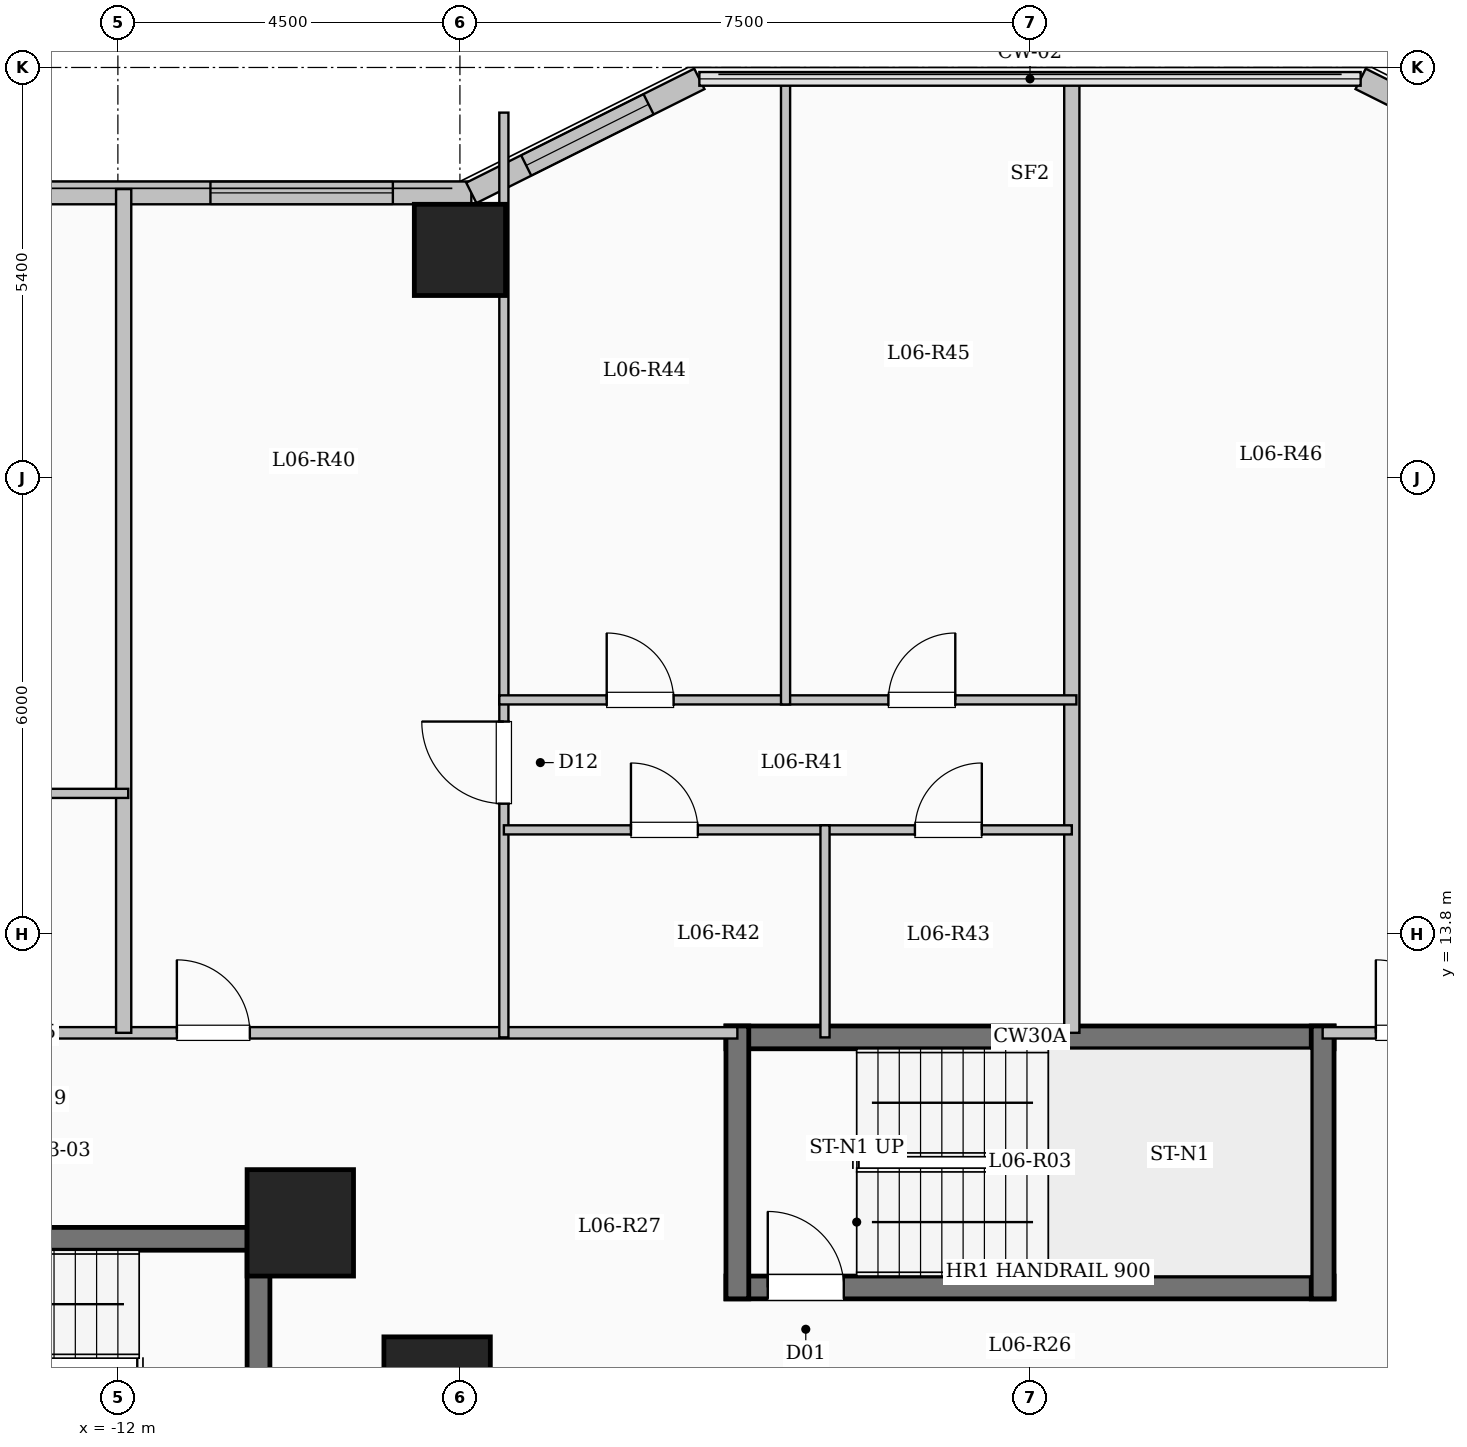
"""IFC4 building model, lengths in metres.
Left out: names, types, materials, properties, quantities, classifications, styles, units other than length and angle.
Written with IfcOpenShell. Run it as: python <this file> out.ifc"""

import sys

from ifc_helpers import new_model, si_unit, direction, frame, frame_2d, origin, origin_2d, place, context, subcontext, project, spatial, rectangle, extrude, element, fill, save


model = new_model("IFC4")
c1 = context("Model", 3, precision=1e-05, world=origin(), true_north=direction((0.0, 1.0)))
c2 = subcontext(c1, "Body", "Model", "MODEL_VIEW")
j1 = project(units=[si_unit("LENGTHUNIT", "METRE"), si_unit("PLANEANGLEUNIT", "RADIAN")], contexts=[c1])
p1 = place(None, origin())
s1 = spatial("IfcSite", under=j1, at=p1, CompositionType="ELEMENT")
p2 = place(p1, origin())
s2 = spatial("IfcBuilding", under=s1, at=p2, CompositionType="ELEMENT")
p3 = place(p2, frame((0.0, 0.0, 27.35)))
s3 = spatial("IfcBuildingStorey", under=s2, at=p3, CompositionType="ELEMENT", Elevation=27.35)
for number, where, z_axis, x_axis in (
    (1, (-7.8, 7.8, 0.0), (0.0, 0.0, 1.0), (1.0, 0.0, 0.0)),
    (2, (-9.6, 10.0, 0.0), (0.0, 0.0, 1.0), (1.0, 0.0, 0.0)),
):
    element("IfcColumn", number, at=place(p3, frame(where, z_axis=z_axis, x_axis=x_axis)), inside=s3, PredefinedType="COLUMN", context=c2, shape_type="SweptSolid", body=[
        extrude(rectangle(XDim=1.4, YDim=1.4, at=origin_2d()), origin(), (0.0, 0.0, 1.0), 3.35),
    ])
p4 = place(p3, frame((-7.5, 22.8, 0.0), z_axis=(0.0, 0.0, 1.0), x_axis=(1.0, 0.0, 0.0)))
e3 = element("IfcColumn", 3, at=p4, inside=s3, PredefinedType="COLUMN", context=c2, shape_type="SweptSolid", body=[
    extrude(rectangle(XDim=1.2, YDim=1.2, at=origin_2d()), origin(), (0.0, 0.0, 1.0), 3.35),
])
p5 = place(p3, frame((-22.65, 23.55, 0.0), z_axis=(0.0, 0.0, 1.0), x_axis=(1.0, 0.0, 0.0)))
e4 = element("IfcWall", 4, at=p5, inside=s3, PredefinedType="SOLIDWALL", context=c2, shape_type="SweptSolid", body=[
    extrude(rectangle(XDim=15.3, YDim=0.3, at=frame_2d((7.65, 0.0))), origin(), (0.0, 0.0, 1.0), 3.1),
])
p6 = place(p5, frame((1.81, 0.0, 0.9)))
e5 = element("IfcOpeningElement", 5, at=p6, cuts=e4, PredefinedType="OPENING", context=c2, shape_type="SweptSolid", body=[
    extrude(rectangle(XDim=2.4, YDim=1.8, at=frame_2d((1.2, 0.9))), frame((0.0, 0.16, 0.0), z_axis=(0.0, -1.0, 0.0), x_axis=(1.0, 0.0, 0.0)), (0.0, 0.0, 1.0), 0.32),
])
p7 = place(p5, frame((7.427, 0.0, 0.9)))
e6 = element("IfcOpeningElement", 6, at=p7, cuts=e4, PredefinedType="OPENING", context=c2, shape_type="SweptSolid", body=[
    extrude(rectangle(XDim=1.8, YDim=1.65, at=frame_2d((0.9, 0.825))), frame((0.0, 0.16, 0.0), z_axis=(0.0, -1.0, 0.0), x_axis=(1.0, 0.0, 0.0)), (0.0, 0.0, 1.0), 0.32),
])
p8 = place(p5, frame((11.868, 0.0, 0.9)))
e7 = element("IfcOpeningElement", 7, at=p8, cuts=e4, PredefinedType="OPENING", context=c2, shape_type="SweptSolid", body=[
    extrude(rectangle(XDim=2.4, YDim=1.8, at=frame_2d((1.2, 0.9))), frame((0.0, 0.16, 0.0), z_axis=(0.0, -1.0, 0.0), x_axis=(1.0, 0.0, 0.0)), (0.0, 0.0, 1.0), 0.32),
])
p9 = place(p3, frame((-7.35, 23.55, 0.0), z_axis=(0.0, 0.0, 1.0), x_axis=(0.894427191, 0.4472135955, 0.0)))
e8 = element("IfcWall", 8, at=p9, inside=s3, PredefinedType="SOLIDWALL", context=c2, shape_type="SweptSolid", body=[
    extrude(rectangle(XDim=3.354, YDim=0.3, at=frame_2d((1.677, 0.0))), origin(), (0.0, 0.0, 1.0), 3.1),
])
p10 = place(p9, frame((0.807, 0.0, 0.9)))
e9 = element("IfcOpeningElement", 9, at=p10, cuts=e8, PredefinedType="OPENING", context=c2, shape_type="SweptSolid", body=[
    extrude(rectangle(XDim=1.8, YDim=1.65, at=frame_2d((0.9, 0.825))), frame((0.0, 0.16, 0.0), z_axis=(0.0, -1.0, 0.0), x_axis=(1.0, 0.0, 0.0)), (0.0, 0.0, 1.0), 0.32),
])
p11 = place(p3, frame((4.35, 25.05, 0.0), z_axis=(0.0, 0.0, 1.0), x_axis=(0.894427191, -0.4472135955, 0.0)))
e10 = element("IfcWall", 10, at=p11, inside=s3, PredefinedType="SOLIDWALL", context=c2, shape_type="SweptSolid", body=[
    extrude(rectangle(XDim=3.354, YDim=0.3, at=frame_2d((1.677, 0.0))), origin(), (0.0, 0.0, 1.0), 3.1),
])
p12 = place(p11, frame((2.308, 0.0, 0.95)))
e11 = element("IfcOpeningElement", 11, at=p12, cuts=e10, PredefinedType="OPENING", context=c2, shape_type="SweptSolid", body=[
    extrude(rectangle(XDim=0.7, YDim=1.5, at=frame_2d((0.35, 0.75))), frame((0.0, 0.16, 0.0), z_axis=(0.0, -1.0, 0.0), x_axis=(1.0, 0.0, 0.0)), (0.0, 0.0, 1.0), 0.32),
])
p13 = place(p3, frame((-18.0, 9.79, 0.0), z_axis=(0.0, 0.0, 1.0), x_axis=(1.0, 0.0, 0.0)))
e12 = element("IfcWall", 12, at=p13, inside=s3, PredefinedType="SHEAR", context=c2, shape_type="SweptSolid", body=[
    extrude(rectangle(XDim=8.0, YDim=0.3, at=frame_2d((4.0, 0.0))), origin(), (0.0, 0.0, 1.0), 3.35),
])
p14 = place(p3, frame((-10.15, 6.35, 0.0), z_axis=(0.0, 0.0, 1.0), x_axis=(0.0, 1.0, 0.0)))
e13 = element("IfcWall", 13, at=p14, inside=s3, PredefinedType="SHEAR", context=c2, shape_type="SweptSolid", body=[
    extrude(rectangle(XDim=3.59, YDim=0.3, at=frame_2d((1.795, 0.0))), origin(), (0.0, 0.0, 1.0), 3.35),
])
p15 = place(p3, frame((-4.0, 12.44, 0.0), z_axis=(0.0, 0.0, 1.0), x_axis=(1.0, 0.0, 0.0)))
e14 = element("IfcWall", 14, at=p15, inside=s3, PredefinedType="SHEAR", context=c2, shape_type="SweptSolid", body=[
    extrude(rectangle(XDim=8.0, YDim=0.3, at=frame_2d((4.0, 0.0))), origin(), (0.0, 0.0, 1.0), 3.35),
])
p16 = place(p3, frame((-4.0, 9.15, 0.0), z_axis=(0.0, 0.0, 1.0), x_axis=(1.0, 0.0, 0.0)))
e15 = element("IfcWall", 15, at=p16, inside=s3, PredefinedType="SHEAR", context=c2, shape_type="SweptSolid", body=[
    extrude(rectangle(XDim=8.0, YDim=0.3, at=frame_2d((4.0, 0.0))), origin(), (0.0, 0.0, 1.0), 3.35),
])
p17 = place(p16, frame((0.55, 0.0, 0.0)))
e16 = element("IfcOpeningElement", 16, at=p17, cuts=e15, PredefinedType="OPENING", context=c2, shape_type="SweptSolid", body=[
    extrude(rectangle(XDim=1.0, YDim=2.15, at=frame_2d((0.5, 1.075))), frame((0.0, 0.16, 0.0), z_axis=(0.0, -1.0, 0.0), x_axis=(1.0, 0.0, 0.0)), (0.0, 0.0, 1.0), 0.32),
])
for number, where, z_axis, x_axis in (
    (17, (-3.85, 9.0, 0.0), (0.0, 0.0, 1.0), (0.0, 1.0, 0.0)),
    (18, (3.85, 9.0, 0.0), (0.0, 0.0, 1.0), (0.0, 1.0, 0.0)),
):
    element("IfcWall", number, at=place(p3, frame(where, z_axis=z_axis, x_axis=x_axis)), inside=s3, PredefinedType="SHEAR", context=c2, shape_type="SweptSolid", body=[
        extrude(rectangle(XDim=3.59, YDim=0.3, at=frame_2d((1.795, 0.0))), origin(), (0.0, 0.0, 1.0), 3.35),
    ])
p18 = place(p3, frame((-22.55, 12.5, 0.0), z_axis=(0.0, 0.0, 1.0), x_axis=(1.0, 0.0, 0.0)))
e19 = element("IfcWall", 19, at=p18, inside=s3, PredefinedType="PARTITIONING", context=c2, shape_type="SweptSolid", body=[
    extrude(rectangle(XDim=18.7, YDim=0.15, at=frame_2d((9.35, 0.0))), origin(), (0.0, 0.0, 1.0), 3.1),
])
p19 = place(p18, frame((0.7, 0.0, 0.0)))
e20 = element("IfcOpeningElement", 20, at=p19, cuts=e19, PredefinedType="OPENING", context=c2, shape_type="SweptSolid", body=[
    extrude(rectangle(XDim=0.96, YDim=2.15, at=frame_2d((0.48, 1.075))), frame((0.0, 0.085, 0.0), z_axis=(0.0, -1.0, 0.0), x_axis=(1.0, 0.0, 0.0)), (0.0, 0.0, 1.0), 0.17),
])
p20 = place(p18, frame((11.326, 0.0, 0.0)))
e21 = element("IfcOpeningElement", 21, at=p20, cuts=e19, PredefinedType="OPENING", context=c2, shape_type="SweptSolid", body=[
    extrude(rectangle(XDim=0.96, YDim=2.15, at=frame_2d((0.48, 1.075))), frame((0.0, 0.085, 0.0), z_axis=(0.0, -1.0, 0.0), x_axis=(1.0, 0.0, 0.0)), (0.0, 0.0, 1.0), 0.17),
])
p21 = place(p3, frame((3.85, 12.5, 0.0), z_axis=(0.0, 0.0, 1.0), x_axis=(1.0, 0.0, 0.0)))
e22 = element("IfcWall", 22, at=p21, inside=s3, PredefinedType="PARTITIONING", context=c2, shape_type="SweptSolid", body=[
    extrude(rectangle(XDim=18.7, YDim=0.15, at=frame_2d((9.35, 0.0))), origin(), (0.0, 0.0, 1.0), 3.1),
])
p22 = place(p21, frame((0.7, 0.0, 0.0)))
e23 = element("IfcOpeningElement", 23, at=p22, cuts=e22, PredefinedType="OPENING", context=c2, shape_type="SweptSolid", body=[
    extrude(rectangle(XDim=0.96, YDim=2.15, at=frame_2d((0.48, 1.075))), frame((0.0, 0.085, 0.0), z_axis=(0.0, -1.0, 0.0), x_axis=(1.0, 0.0, 0.0)), (0.0, 0.0, 1.0), 0.17),
])
p23 = place(p21, frame((8.4, 0.0, 0.0)))
e24 = element("IfcOpeningElement", 24, at=p23, cuts=e22, PredefinedType="OPENING", context=c2, shape_type="SweptSolid", body=[
    extrude(rectangle(XDim=0.96, YDim=2.15, at=frame_2d((0.48, 1.075))), frame((0.0, 0.085, 0.0), z_axis=(0.0, -1.0, 0.0), x_axis=(1.0, 0.0, 0.0)), (0.0, 0.0, 1.0), 0.17),
])
p24 = place(p3, frame((0.55, 12.5, 0.0), z_axis=(0.0, 0.0, 1.0), x_axis=(0.0, 1.0, 0.0)))
e25 = element("IfcWall", 25, at=p24, inside=s3, PredefinedType="SOLIDWALL", context=c2, shape_type="SweptSolid", body=[
    extrude(rectangle(XDim=12.58, YDim=0.2, at=frame_2d((6.29, 0.0))), origin(), (0.0, 0.0, 1.0), 3.1),
])
p25 = place(p3, frame((-11.924, 12.5, 0.0), z_axis=(0.0, 0.0, 1.0), x_axis=(0.0, 1.0, 0.0)))
e26 = element("IfcWall", 26, at=p25, inside=s3, PredefinedType="SOLIDWALL", context=c2, shape_type="SweptSolid", body=[
    extrude(rectangle(XDim=11.1, YDim=0.2, at=frame_2d((5.55, 0.0))), origin(), (0.0, 0.0, 1.0), 3.1),
])
p26 = place(p3, frame((-16.744, 15.65, 0.0), z_axis=(0.0, 0.0, 1.0), x_axis=(1.0, 0.0, 0.0)))
e27 = element("IfcWall", 27, at=p26, inside=s3, PredefinedType="PARTITIONING", context=c2, shape_type="SweptSolid", body=[
    extrude(rectangle(XDim=4.88, YDim=0.12, at=frame_2d((2.44, 0.0))), origin(), (0.0, 0.0, 1.0), 3.1),
])
p27 = place(p3, frame((-6.922, 12.44, 0.0), z_axis=(0.0, 0.0, 1.0), x_axis=(0.0, 1.0, 0.0)))
e28 = element("IfcWall", 28, at=p27, inside=s3, PredefinedType="PARTITIONING", context=c2, shape_type="SweptSolid", body=[
    extrude(rectangle(XDim=12.166, YDim=0.12, at=frame_2d((6.083, 0.0))), origin(), (0.0, 0.0, 1.0), 3.1),
])
p28 = place(p27, frame((3.075, 0.0, 0.0)))
e29 = element("IfcOpeningElement", 29, at=p28, cuts=e28, PredefinedType="OPENING", context=c2, shape_type="SweptSolid", body=[
    extrude(rectangle(XDim=1.08, YDim=2.15, at=frame_2d((0.54, 1.075))), frame((0.0, 0.07, 0.0), z_axis=(0.0, -1.0, 0.0), x_axis=(1.0, 0.0, 0.0)), (0.0, 0.0, 1.0), 0.14),
])
p29 = place(p3, frame((-6.922, 15.17, 0.0), z_axis=(0.0, 0.0, 1.0), x_axis=(1.0, 0.0, 0.0)))
e30 = element("IfcWall", 30, at=p29, inside=s3, PredefinedType="PARTITIONING", context=c2, shape_type="SweptSolid", body=[
    extrude(rectangle(XDim=4.225, YDim=0.12, at=frame_2d((2.113, 0.0))), origin(), (0.0, 0.0, 1.0), 3.1),
])
p30 = place(p29, frame((1.672, 0.0, 0.0)))
e31 = element("IfcOpeningElement", 31, at=p30, cuts=e30, PredefinedType="OPENING", context=c2, shape_type="SweptSolid", body=[
    extrude(rectangle(XDim=0.88, YDim=2.1, at=frame_2d((0.44, 1.05))), frame((0.0, 0.07, 0.0), z_axis=(0.0, -1.0, 0.0), x_axis=(1.0, 0.0, 0.0)), (0.0, 0.0, 1.0), 0.14),
])
p31 = place(p3, frame((-2.697, 15.17, 0.0), z_axis=(0.0, 0.0, 1.0), x_axis=(1.0, 0.0, 0.0)))
e32 = element("IfcWall", 32, at=p31, inside=s3, PredefinedType="PARTITIONING", context=c2, shape_type="SweptSolid", body=[
    extrude(rectangle(XDim=3.247, YDim=0.12, at=frame_2d((1.624, 0.0))), origin(), (0.0, 0.0, 1.0), 3.1),
])
p32 = place(p31, frame((1.183, 0.0, 0.0)))
e33 = element("IfcOpeningElement", 33, at=p32, cuts=e32, PredefinedType="OPENING", context=c2, shape_type="SweptSolid", body=[
    extrude(rectangle(XDim=0.88, YDim=2.1, at=frame_2d((0.44, 1.05))), frame((0.0, 0.07, 0.0), z_axis=(0.0, -1.0, 0.0), x_axis=(1.0, 0.0, 0.0)), (0.0, 0.0, 1.0), 0.14),
])
p33 = place(p3, frame((-6.982, 16.88, 0.0), z_axis=(0.0, 0.0, 1.0), x_axis=(1.0, 0.0, 0.0)))
e34 = element("IfcWall", 34, at=p33, inside=s3, PredefinedType="PARTITIONING", context=c2, shape_type="SweptSolid", body=[
    extrude(rectangle(XDim=7.592, YDim=0.12, at=frame_2d((3.796, 0.0))), origin(), (0.0, 0.0, 1.0), 3.1),
])
p34 = place(p33, frame((1.413, 0.0, 0.0)))
e35 = element("IfcOpeningElement", 35, at=p34, cuts=e34, PredefinedType="OPENING", context=c2, shape_type="SweptSolid", body=[
    extrude(rectangle(XDim=0.88, YDim=2.1, at=frame_2d((0.44, 1.05))), frame((0.0, 0.07, 0.0), z_axis=(0.0, -1.0, 0.0), x_axis=(1.0, 0.0, 0.0)), (0.0, 0.0, 1.0), 0.14),
])
p35 = place(p33, frame((5.119, 0.0, 0.0)))
e36 = element("IfcOpeningElement", 36, at=p35, cuts=e34, PredefinedType="OPENING", context=c2, shape_type="SweptSolid", body=[
    extrude(rectangle(XDim=0.88, YDim=2.1, at=frame_2d((0.44, 1.05))), frame((0.0, 0.07, 0.0), z_axis=(0.0, -1.0, 0.0), x_axis=(1.0, 0.0, 0.0)), (0.0, 0.0, 1.0), 0.14),
])
p36 = place(p3, frame((-2.697, 12.44, 0.0), z_axis=(0.0, 0.0, 1.0), x_axis=(0.0, 1.0, 0.0)))
e37 = element("IfcWall", 37, at=p36, inside=s3, PredefinedType="PARTITIONING", context=c2, shape_type="SweptSolid", body=[
    extrude(rectangle(XDim=2.79, YDim=0.12, at=frame_2d((1.395, 0.0))), origin(), (0.0, 0.0, 1.0), 3.1),
])
p37 = place(p3, frame((-3.216, 16.82, 0.0), z_axis=(0.0, 0.0, 1.0), x_axis=(0.0, 1.0, 0.0)))
e38 = element("IfcWall", 38, at=p37, inside=s3, PredefinedType="PARTITIONING", context=c2, shape_type="SweptSolid", body=[
    extrude(rectangle(XDim=8.26, YDim=0.12, at=frame_2d((4.13, 0.0))), origin(), (0.0, 0.0, 1.0), 3.1),
])
p38 = place(p8, origin())
e39 = element("IfcWindow", 39, at=p38, inside=s3, PartitioningType="SINGLE_PANEL", PredefinedType="WINDOW", context=c2, shape_type="SweptSolid", body=[
    extrude(rectangle(XDim=2.4, YDim=1.8, at=frame_2d((1.2, 0.9))), frame((0.0, 0.03, 0.0), z_axis=(0.0, -1.0, 0.0), x_axis=(1.0, 0.0, 0.0)), (0.0, 0.0, 1.0), 0.06),
])
fill(e7, e39)
p39 = place(p10, origin())
e40 = element("IfcWindow", 40, at=p39, inside=s3, PartitioningType="SINGLE_PANEL", PredefinedType="WINDOW", context=c2, shape_type="SweptSolid", body=[
    extrude(rectangle(XDim=1.8, YDim=1.65, at=frame_2d((0.9, 0.825))), frame((0.0, 0.03, 0.0), z_axis=(0.0, -1.0, 0.0), x_axis=(1.0, 0.0, 0.0)), (0.0, 0.0, 1.0), 0.06),
])
fill(e9, e40)
p40 = place(p17, origin())
e41 = element("IfcDoor", 41, at=p40, inside=s3, OperationType="SINGLE_SWING_LEFT", PredefinedType="DOOR", context=c2, shape_type="SweptSolid", body=[
    extrude(rectangle(XDim=1.0, YDim=2.15, at=frame_2d((0.5, 1.075))), frame((0.0, 0.025, 0.0), z_axis=(0.0, -1.0, 0.0), x_axis=(1.0, 0.0, 0.0)), (0.0, 0.0, 1.0), 0.05),
])
fill(e16, e41)
p41 = place(p20, origin())
e42 = element("IfcDoor", 42, at=p41, inside=s3, OperationType="SINGLE_SWING_LEFT", PredefinedType="DOOR", context=c2, shape_type="SweptSolid", body=[
    extrude(rectangle(XDim=0.96, YDim=2.15, at=frame_2d((0.48, 1.075))), frame((0.0, 0.025, 0.0), z_axis=(0.0, -1.0, 0.0), x_axis=(1.0, 0.0, 0.0)), (0.0, 0.0, 1.0), 0.05),
])
fill(e21, e42)
p42 = place(p28, origin())
e43 = element("IfcDoor", 43, at=p42, inside=s3, OperationType="SINGLE_SWING_RIGHT", PredefinedType="DOOR", context=c2, shape_type="SweptSolid", body=[
    extrude(rectangle(XDim=1.08, YDim=2.15, at=frame_2d((0.54, 1.075))), frame((0.0, 0.025, 0.0), z_axis=(0.0, -1.0, 0.0), x_axis=(1.0, 0.0, 0.0)), (0.0, 0.0, 1.0), 0.05),
])
fill(e29, e43)
p43 = place(p30, origin())
e44 = element("IfcDoor", 44, at=p43, inside=s3, OperationType="SINGLE_SWING_LEFT", PredefinedType="DOOR", context=c2, shape_type="SweptSolid", body=[
    extrude(rectangle(XDim=0.88, YDim=2.1, at=frame_2d((0.44, 1.05))), frame((0.0, 0.025, 0.0), z_axis=(0.0, -1.0, 0.0), x_axis=(1.0, 0.0, 0.0)), (0.0, 0.0, 1.0), 0.05),
])
fill(e31, e44)
p44 = place(p32, origin())
e45 = element("IfcDoor", 45, at=p44, inside=s3, OperationType="SINGLE_SWING_RIGHT", PredefinedType="DOOR", context=c2, shape_type="SweptSolid", body=[
    extrude(rectangle(XDim=0.88, YDim=2.1, at=frame_2d((0.44, 1.05))), frame((0.0, 0.025, 0.0), z_axis=(0.0, -1.0, 0.0), x_axis=(1.0, 0.0, 0.0)), (0.0, 0.0, 1.0), 0.05),
])
fill(e33, e45)
p45 = place(p34, origin())
e46 = element("IfcDoor", 46, at=p45, inside=s3, OperationType="SINGLE_SWING_LEFT", PredefinedType="DOOR", context=c2, shape_type="SweptSolid", body=[
    extrude(rectangle(XDim=0.88, YDim=2.1, at=frame_2d((0.44, 1.05))), frame((0.0, 0.025, 0.0), z_axis=(0.0, -1.0, 0.0), x_axis=(1.0, 0.0, 0.0)), (0.0, 0.0, 1.0), 0.05),
])
fill(e35, e46)
p46 = place(p35, origin())
e47 = element("IfcDoor", 47, at=p46, inside=s3, OperationType="SINGLE_SWING_RIGHT", PredefinedType="DOOR", context=c2, shape_type="SweptSolid", body=[
    extrude(rectangle(XDim=0.88, YDim=2.1, at=frame_2d((0.44, 1.05))), frame((0.0, 0.025, 0.0), z_axis=(0.0, -1.0, 0.0), x_axis=(1.0, 0.0, 0.0)), (0.0, 0.0, 1.0), 0.05),
])
fill(e36, e47)
p47 = place(p22, origin())
e48 = element("IfcDoor", 48, at=p47, inside=s3, OperationType="SINGLE_SWING_LEFT", PredefinedType="DOOR", context=c2, shape_type="SweptSolid", body=[
    extrude(rectangle(XDim=0.96, YDim=2.15, at=frame_2d((0.48, 1.075))), frame((0.0, 0.025, 0.0), z_axis=(0.0, -1.0, 0.0), x_axis=(1.0, 0.0, 0.0)), (0.0, 0.0, 1.0), 0.05),
])
fill(e23, e48)
save(model, sys.argv[1])
